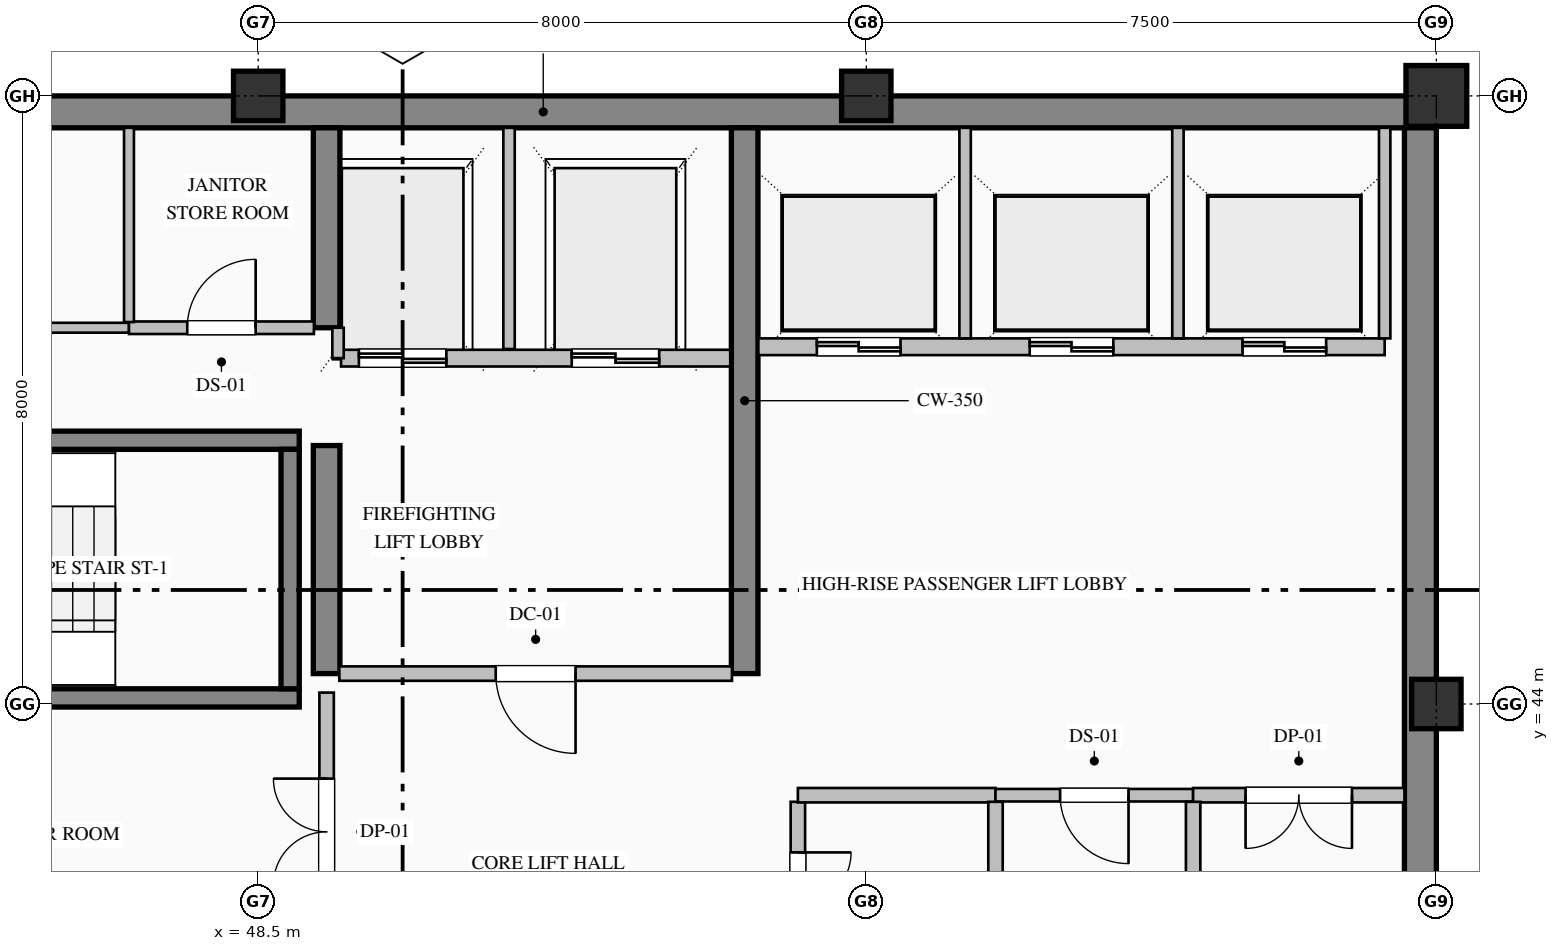
"""IFC4 building model, lengths in metres.
Left out: names, types, materials, properties, quantities, classifications, styles, units other than length and angle.
Written with IfcOpenShell. Run it as: python <this file> out.ifc"""

import sys

from ifc_helpers import new_model, si_unit, direction, frame, frame_2d, origin, origin_2d, place, context, subcontext, project, spatial, rectangle, hollow_rectangle, extrude, element, fill, save


model = new_model("IFC4")
c1 = context("Model", 3, precision=1e-05, world=origin(), true_north=direction((0.0, 1.0)))
c2 = subcontext(c1, "Body", "Model", "MODEL_VIEW")
j1 = project(units=[si_unit("LENGTHUNIT", "METRE"), si_unit("PLANEANGLEUNIT", "RADIAN")], contexts=[c1])
p1 = place(None, origin())
s1 = spatial("IfcSite", under=j1, at=p1, CompositionType="ELEMENT")
p2 = place(p1, origin())
s2 = spatial("IfcBuilding", under=s1, at=p2, CompositionType="ELEMENT")
p3 = place(p2, frame((0.0, 0.0, 373.0)))
s3 = spatial("IfcBuildingStorey", under=s2, at=p3, CompositionType="ELEMENT", Elevation=373.0)
p4 = place(p3, frame((40.5, 51.79, 0.0), z_axis=(0.0, 0.0, 1.0), x_axis=(1.0, 0.0, 0.0)))
e1 = element("IfcWall", 1, at=p4, inside=s3, PredefinedType="SHEAR", context=c2, shape_type="SweptSolid", body=[
    extrude(rectangle(XDim=23.5, YDim=0.42, at=frame_2d((11.75, 0.0))), origin(), (0.0, 0.0, 1.0), 5.11),
])
p5 = place(p3, frame((63.79, 36.32, 0.0), z_axis=(0.0, 0.0, 1.0), x_axis=(0.0, 1.0, 0.0)))
e2 = element("IfcWall", 2, at=p5, inside=s3, PredefinedType="SHEAR", context=c2, shape_type="SweptSolid", body=[
    extrude(rectangle(XDim=15.26, YDim=0.42, at=frame_2d((7.63, 0.0))), origin(), (0.0, 0.0, 1.0), 5.11),
])
p6 = place(p3, frame((49.4, 44.4, 0.0), z_axis=(0.0, 0.0, 1.0), x_axis=(0.0, 1.0, 0.0)))
e3 = element("IfcWall", 3, at=p6, inside=s3, PredefinedType="SHEAR", context=c2, shape_type="SweptSolid", body=[
    extrude(rectangle(XDim=3.0, YDim=0.35, at=frame_2d((1.5, 0.0))), origin(), (0.0, 0.0, 1.0), 5.11),
])
p7 = place(p3, frame((49.4, 48.95, 0.0), z_axis=(0.0, 0.0, 1.0), x_axis=(0.0, 1.0, 0.0)))
e4 = element("IfcWall", 4, at=p7, inside=s3, PredefinedType="SHEAR", context=c2, shape_type="SweptSolid", body=[
    extrude(rectangle(XDim=2.63, YDim=0.35, at=frame_2d((1.315, 0.0))), origin(), (0.0, 0.0, 1.0), 5.11),
])
p8 = place(p3, frame((54.9, 44.4, 0.0), z_axis=(0.0, 0.0, 1.0), x_axis=(0.0, 1.0, 0.0)))
e5 = element("IfcWall", 5, at=p8, inside=s3, PredefinedType="SHEAR", context=c2, shape_type="SweptSolid", body=[
    extrude(rectangle(XDim=7.18, YDim=0.35, at=frame_2d((3.59, 0.0))), origin(), (0.0, 0.0, 1.0), 5.11),
])
for number, where, z_axis, x_axis in (
    (6, (48.5, 52.0, 0.0), (0.0, 0.0, 1.0), (1.0, 0.0, 0.0)),
    (7, (56.5, 52.0, 0.0), (0.0, 0.0, 1.0), (1.0, 0.0, 0.0)),
    (8, (64.0, 44.0, 0.0), (0.0, 0.0, 1.0), (1.0, 0.0, 0.0)),
):
    element("IfcColumn", number, at=place(p3, frame(where, z_axis=z_axis, x_axis=x_axis)), inside=s3, PredefinedType="COLUMN", context=c2, shape_type="SweptSolid", body=[
        extrude(hollow_rectangle(XDim=0.65, YDim=0.65, WallThickness=0.028, at=origin_2d()), origin(), (0.0, 0.0, 1.0), 5.4),
    ])
p9 = place(p3, frame((64.0, 52.0, 0.0), z_axis=(0.0, 0.0, 1.0), x_axis=(1.0, 0.0, 0.0)))
e9 = element("IfcColumn", 9, at=p9, inside=s3, PredefinedType="COLUMN", context=c2, shape_type="SweptSolid", body=[
    extrude(hollow_rectangle(XDim=0.8, YDim=0.8, WallThickness=0.032, at=origin_2d()), origin(), (0.0, 0.0, 1.0), 5.4),
])
for number, where, z_axis, x_axis in (
    (10, (40.96, 47.47, 0.0), (0.0, 0.0, 1.0), (1.0, 0.0, 0.0)),
    (11, (49.04, 44.08, 0.0), (0.0, 0.0, 1.0), (-1.0, 0.0, 0.0)),
):
    element("IfcWall", number, at=place(p3, frame(where, z_axis=z_axis, x_axis=x_axis)), inside=s3, PredefinedType="SOLIDWALL", context=c2, shape_type="SweptSolid", body=[
        extrude(rectangle(XDim=8.08, YDim=0.24, at=frame_2d((4.04, 0.0))), origin(), (0.0, 0.0, 1.0), 5.4),
    ])
p10 = place(p3, frame((48.92, 44.2, 0.0), z_axis=(0.0, 0.0, 1.0), x_axis=(0.0, 1.0, 0.0)))
e12 = element("IfcWall", 12, at=p10, inside=s3, PredefinedType="SOLIDWALL", context=c2, shape_type="SweptSolid", body=[
    extrude(rectangle(XDim=3.15, YDim=0.24, at=frame_2d((1.575, 0.0))), origin(), (0.0, 0.0, 1.0), 5.4),
])
p11 = place(p3, frame((54.71, 48.55, 0.0), z_axis=(0.0, 0.0, 1.0), x_axis=(-1.0, 0.0, 0.0)))
e13 = element("IfcWall", 13, at=p11, inside=s3, PredefinedType="PARTITIONING", context=c2, shape_type="SweptSolid", body=[
    extrude(rectangle(XDim=5.12, YDim=0.22, at=frame_2d((2.56, 0.0))), origin(), (0.0, 0.0, 1.0), 5.11),
])
p12 = place(p11, frame((3.735, 0.0, 0.0)))
e14 = element("IfcOpeningElement", 14, at=p12, cuts=e13, PredefinedType="OPENING", context=c2, shape_type="SweptSolid", body=[
    extrude(rectangle(XDim=1.15, YDim=2.2, at=frame_2d((0.575, 1.1))), frame((0.0, 0.12, 0.0), z_axis=(0.0, -1.0, 0.0), x_axis=(1.0, 0.0, 0.0)), (0.0, 0.0, 1.0), 0.24),
])
p13 = place(p11, frame((0.935, 0.0, 0.0)))
e15 = element("IfcOpeningElement", 15, at=p13, cuts=e13, PredefinedType="OPENING", context=c2, shape_type="SweptSolid", body=[
    extrude(rectangle(XDim=1.15, YDim=2.2, at=frame_2d((0.575, 1.1))), frame((0.0, 0.12, 0.0), z_axis=(0.0, -1.0, 0.0), x_axis=(1.0, 0.0, 0.0)), (0.0, 0.0, 1.0), 0.24),
])
p14 = place(p3, frame((51.8, 48.67, 0.0), z_axis=(0.0, 0.0, 1.0), x_axis=(0.0, 1.0, 0.0)))
e16 = element("IfcWall", 16, at=p14, inside=s3, PredefinedType="PARTITIONING", context=c2, shape_type="SweptSolid", body=[
    extrude(rectangle(XDim=2.91, YDim=0.15, at=frame_2d((1.455, 0.0))), origin(), (0.0, 0.0, 1.0), 5.11),
])
p15 = place(p3, frame((49.55, 48.55, 0.0), z_axis=(0.0, 0.0, 1.0), x_axis=(0.0, 1.0, 0.0)))
e17 = element("IfcWall", 17, at=p15, inside=s3, PredefinedType="PARTITIONING", context=c2, shape_type="SweptSolid", body=[
    extrude(rectangle(XDim=0.4, YDim=0.15, at=frame_2d((0.2, 0.0))), origin(), (0.0, 0.0, 1.0), 5.11),
])
p16 = place(p3, frame((63.32, 48.7, 0.0), z_axis=(0.0, 0.0, 1.0), x_axis=(-1.0, 0.0, 0.0)))
e18 = element("IfcWall", 18, at=p16, inside=s3, PredefinedType="PARTITIONING", context=c2, shape_type="SweptSolid", body=[
    extrude(rectangle(XDim=8.24, YDim=0.22, at=frame_2d((4.12, 0.0))), origin(), (0.0, 0.0, 1.0), 5.11),
])
p17 = place(p16, frame((6.37, 0.0, 0.0)))
e19 = element("IfcOpeningElement", 19, at=p17, cuts=e18, PredefinedType="OPENING", context=c2, shape_type="SweptSolid", body=[
    extrude(rectangle(XDim=1.1, YDim=2.2, at=frame_2d((0.55, 1.1))), frame((0.0, 0.12, 0.0), z_axis=(0.0, -1.0, 0.0), x_axis=(1.0, 0.0, 0.0)), (0.0, 0.0, 1.0), 0.24),
])
p18 = place(p16, frame((3.57, 0.0, 0.0)))
e20 = element("IfcOpeningElement", 20, at=p18, cuts=e18, PredefinedType="OPENING", context=c2, shape_type="SweptSolid", body=[
    extrude(rectangle(XDim=1.1, YDim=2.2, at=frame_2d((0.55, 1.1))), frame((0.0, 0.12, 0.0), z_axis=(0.0, -1.0, 0.0), x_axis=(1.0, 0.0, 0.0)), (0.0, 0.0, 1.0), 0.24),
])
p19 = place(p16, frame((0.77, 0.0, 0.0)))
e21 = element("IfcOpeningElement", 21, at=p19, cuts=e18, PredefinedType="OPENING", context=c2, shape_type="SweptSolid", body=[
    extrude(rectangle(XDim=1.1, YDim=2.2, at=frame_2d((0.55, 1.1))), frame((0.0, 0.12, 0.0), z_axis=(0.0, -1.0, 0.0), x_axis=(1.0, 0.0, 0.0)), (0.0, 0.0, 1.0), 0.24),
])
for number, where, z_axis, x_axis in (
    (22, (57.8, 48.81, 0.0), (0.0, 0.0, 1.0), (0.0, 1.0, 0.0)),
    (23, (60.6, 48.81, 0.0), (0.0, 0.0, 1.0), (0.0, 1.0, 0.0)),
    (24, (63.32, 48.81, 0.0), (0.0, 0.0, 1.0), (0.0, 1.0, 0.0)),
):
    element("IfcWall", number, at=place(p3, frame(where, z_axis=z_axis, x_axis=x_axis)), inside=s3, PredefinedType="PARTITIONING", context=c2, shape_type="SweptSolid", body=[
        extrude(rectangle(XDim=2.77, YDim=0.15, at=frame_2d((1.385, 0.0))), origin(), (0.0, 0.0, 1.0), 5.11),
    ])
p20 = place(p3, frame((40.92, 48.95, 0.0), z_axis=(0.0, 0.0, 1.0), x_axis=(1.0, 0.0, 0.0)))
e25 = element("IfcWall", 25, at=p20, inside=s3, PredefinedType="PARTITIONING", context=c2, shape_type="SweptSolid", body=[
    extrude(rectangle(XDim=5.88, YDim=0.13, at=frame_2d((2.94, 0.0))), origin(), (0.0, 0.0, 1.0), 5.11),
])
p21 = place(p20, frame((2.48, 0.0, 0.0)))
e26 = element("IfcOpeningElement", 26, at=p21, cuts=e25, PredefinedType="OPENING", context=c2, shape_type="SweptSolid", body=[
    extrude(rectangle(XDim=0.92, YDim=2.15, at=frame_2d((0.46, 1.075))), frame((0.0, 0.075, 0.0), z_axis=(0.0, -1.0, 0.0), x_axis=(1.0, 0.0, 0.0)), (0.0, 0.0, 1.0), 0.15),
])
p22 = place(p3, frame((46.8, 48.95, 0.0), z_axis=(0.0, 0.0, 1.0), x_axis=(1.0, 0.0, 0.0)))
e27 = element("IfcWall", 27, at=p22, inside=s3, PredefinedType="PARTITIONING", context=c2, shape_type="SweptSolid", body=[
    extrude(rectangle(XDim=2.433, YDim=0.165, at=frame_2d((1.216, 0.0))), origin(), (0.0, 0.0, 1.0), 5.11),
])
p23 = place(p22, frame((0.767, 0.0, 0.0)))
e28 = element("IfcOpeningElement", 28, at=p23, cuts=e27, PredefinedType="OPENING", context=c2, shape_type="SweptSolid", body=[
    extrude(rectangle(XDim=0.9, YDim=2.15, at=frame_2d((0.45, 1.075))), frame((0.0, 0.093, 0.0), z_axis=(0.0, -1.0, 0.0), x_axis=(1.0, 0.0, 0.0)), (0.0, 0.0, 1.0), 0.185),
])
p24 = place(p3, frame((54.733, 44.4, 0.0), z_axis=(0.0, 0.0, 1.0), x_axis=(-1.0, 0.0, 0.0)))
e29 = element("IfcWall", 29, at=p24, inside=s3, PredefinedType="PARTITIONING", context=c2, shape_type="SweptSolid", body=[
    extrude(rectangle(XDim=5.166, YDim=0.19, at=frame_2d((2.583, 0.0))), origin(), (0.0, 0.0, 1.0), 5.11),
])
p25 = place(p24, frame((2.058, 0.0, 0.0)))
e30 = element("IfcOpeningElement", 30, at=p25, cuts=e29, PredefinedType="OPENING", context=c2, shape_type="SweptSolid", body=[
    extrude(rectangle(XDim=1.05, YDim=2.15, at=frame_2d((0.525, 1.075))), frame((0.0, 0.105, 0.0), z_axis=(0.0, -1.0, 0.0), x_axis=(1.0, 0.0, 0.0)), (0.0, 0.0, 1.0), 0.21),
])
p26 = place(p3, frame((49.4, 40.487, 0.0), z_axis=(0.0, 0.0, 1.0), x_axis=(0.0, 1.0, 0.0)))
e31 = element("IfcWall", 31, at=p26, inside=s3, PredefinedType="PARTITIONING", context=c2, shape_type="SweptSolid", body=[
    extrude(rectangle(XDim=3.663, YDim=0.19, at=frame_2d((1.832, 0.0))), origin(), (0.0, 0.0, 1.0), 4.352),
])
p27 = place(p26, frame((1.132, 0.0, 0.0)))
e32 = element("IfcOpeningElement", 32, at=p27, cuts=e31, PredefinedType="OPENING", context=c2, shape_type="SweptSolid", body=[
    extrude(rectangle(XDim=1.4, YDim=2.25, at=frame_2d((0.7, 1.125))), frame((0.0, 0.105, 0.0), z_axis=(0.0, -1.0, 0.0), x_axis=(1.0, 0.0, 0.0)), (0.0, 0.0, 1.0), 0.21),
])
p28 = place(p3, frame((55.6, 42.713, 0.0), z_axis=(0.0, 0.0, 1.0), x_axis=(0.0, -1.0, 0.0)))
e33 = element("IfcWall", 33, at=p28, inside=s3, PredefinedType="PARTITIONING", context=c2, shape_type="SweptSolid", body=[
    extrude(rectangle(XDim=2.731, YDim=0.19, at=frame_2d((1.365, 0.0))), origin(), (0.0, 0.0, 1.0), 5.11),
])
p29 = place(p28, frame((0.666, 0.0, 0.0)))
e34 = element("IfcOpeningElement", 34, at=p29, cuts=e33, PredefinedType="OPENING", context=c2, shape_type="SweptSolid", body=[
    extrude(rectangle(XDim=1.4, YDim=2.25, at=frame_2d((0.7, 1.125))), frame((0.0, 0.105, 0.0), z_axis=(0.0, -1.0, 0.0), x_axis=(1.0, 0.0, 0.0)), (0.0, 0.0, 1.0), 0.21),
])
p30 = place(p3, frame((58.2, 42.8, 0.0), z_axis=(0.0, 0.0, 1.0), x_axis=(-1.0, 0.0, 0.0)))
e35 = element("IfcWall", 35, at=p30, inside=s3, PredefinedType="PARTITIONING", context=c2, shape_type="SweptSolid", body=[
    extrude(rectangle(XDim=2.6, YDim=0.19, at=frame_2d((1.3, 0.0))), origin(), (0.0, 0.0, 1.0), 5.11),
])
p31 = place(p3, frame((60.8, 42.8, 0.0), z_axis=(0.0, 0.0, 1.0), x_axis=(-1.0, 0.0, 0.0)))
e36 = element("IfcWall", 36, at=p31, inside=s3, PredefinedType="PARTITIONING", context=c2, shape_type="SweptSolid", body=[
    extrude(rectangle(XDim=2.6, YDim=0.165, at=frame_2d((1.3, 0.0))), origin(), (0.0, 0.0, 1.0), 5.11),
])
p32 = place(p31, frame((0.85, 0.0, 0.0)))
e37 = element("IfcOpeningElement", 37, at=p32, cuts=e36, PredefinedType="OPENING", context=c2, shape_type="SweptSolid", body=[
    extrude(rectangle(XDim=0.9, YDim=2.15, at=frame_2d((0.45, 1.075))), frame((0.0, 0.093, 0.0), z_axis=(0.0, -1.0, 0.0), x_axis=(1.0, 0.0, 0.0)), (0.0, 0.0, 1.0), 0.185),
])
p33 = place(p3, frame((63.58, 42.8, 0.0), z_axis=(0.0, 0.0, 1.0), x_axis=(-1.0, 0.0, 0.0)))
e38 = element("IfcWall", 38, at=p33, inside=s3, PredefinedType="PARTITIONING", context=c2, shape_type="SweptSolid", body=[
    extrude(rectangle(XDim=2.78, YDim=0.19, at=frame_2d((1.39, 0.0))), origin(), (0.0, 0.0, 1.0), 5.11),
])
p34 = place(p33, frame((0.69, 0.0, 0.0)))
e39 = element("IfcOpeningElement", 39, at=p34, cuts=e38, PredefinedType="OPENING", context=c2, shape_type="SweptSolid", body=[
    extrude(rectangle(XDim=1.4, YDim=2.25, at=frame_2d((0.7, 1.125))), frame((0.0, 0.105, 0.0), z_axis=(0.0, -1.0, 0.0), x_axis=(1.0, 0.0, 0.0)), (0.0, 0.0, 1.0), 0.21),
])
p35 = place(p3, frame((46.8, 51.58, 0.0), z_axis=(0.0, 0.0, 1.0), x_axis=(0.0, -1.0, 0.0)))
e40 = element("IfcWall", 40, at=p35, inside=s3, PredefinedType="PARTITIONING", context=c2, shape_type="SweptSolid", body=[
    extrude(rectangle(XDim=2.556, YDim=0.13, at=frame_2d((1.278, 0.0))), origin(), (0.0, 0.0, 1.0), 5.11),
])
for number, where, z_axis, x_axis in (
    (41, (58.2, 42.713, 0.0), (0.0, 0.0, 1.0), (0.0, -1.0, 0.0)),
    (42, (60.8, 42.713, 0.0), (0.0, 0.0, 1.0), (0.0, -1.0, 0.0)),
):
    element("IfcWall", number, at=place(p3, frame(where, z_axis=z_axis, x_axis=x_axis)), inside=s3, PredefinedType="PARTITIONING", context=c2, shape_type="SweptSolid", body=[
        extrude(rectangle(XDim=2.731, YDim=0.19, at=frame_2d((1.365, 0.0))), origin(), (0.0, 0.0, 1.0), 5.11),
    ])
p36 = place(p12, origin())
e43 = element("IfcDoor", 43, at=p36, inside=s3, OperationType="DOUBLE_DOOR_SLIDING", PredefinedType="DOOR", context=c2, shape_type="SweptSolid", body=[
    extrude(rectangle(XDim=1.15, YDim=2.2, at=frame_2d((0.575, 1.1))), frame((0.0, 0.025, 0.0), z_axis=(0.0, -1.0, 0.0), x_axis=(1.0, 0.0, 0.0)), (0.0, 0.0, 1.0), 0.05),
])
fill(e14, e43)
p37 = place(p13, origin())
e44 = element("IfcDoor", 44, at=p37, inside=s3, OperationType="DOUBLE_DOOR_SLIDING", PredefinedType="DOOR", context=c2, shape_type="SweptSolid", body=[
    extrude(rectangle(XDim=1.15, YDim=2.2, at=frame_2d((0.575, 1.1))), frame((0.0, 0.025, 0.0), z_axis=(0.0, -1.0, 0.0), x_axis=(1.0, 0.0, 0.0)), (0.0, 0.0, 1.0), 0.05),
])
fill(e15, e44)
p38 = place(p17, origin())
e45 = element("IfcDoor", 45, at=p38, inside=s3, OperationType="DOUBLE_DOOR_SLIDING", PredefinedType="DOOR", context=c2, shape_type="SweptSolid", body=[
    extrude(rectangle(XDim=1.1, YDim=2.2, at=frame_2d((0.55, 1.1))), frame((0.0, 0.025, 0.0), z_axis=(0.0, -1.0, 0.0), x_axis=(1.0, 0.0, 0.0)), (0.0, 0.0, 1.0), 0.05),
])
fill(e19, e45)
p39 = place(p18, origin())
e46 = element("IfcDoor", 46, at=p39, inside=s3, OperationType="DOUBLE_DOOR_SLIDING", PredefinedType="DOOR", context=c2, shape_type="SweptSolid", body=[
    extrude(rectangle(XDim=1.1, YDim=2.2, at=frame_2d((0.55, 1.1))), frame((0.0, 0.025, 0.0), z_axis=(0.0, -1.0, 0.0), x_axis=(1.0, 0.0, 0.0)), (0.0, 0.0, 1.0), 0.05),
])
fill(e20, e46)
p40 = place(p19, origin())
e47 = element("IfcDoor", 47, at=p40, inside=s3, OperationType="DOUBLE_DOOR_SLIDING", PredefinedType="DOOR", context=c2, shape_type="SweptSolid", body=[
    extrude(rectangle(XDim=1.1, YDim=2.2, at=frame_2d((0.55, 1.1))), frame((0.0, 0.025, 0.0), z_axis=(0.0, -1.0, 0.0), x_axis=(1.0, 0.0, 0.0)), (0.0, 0.0, 1.0), 0.05),
])
fill(e21, e47)
p41 = place(p25, origin())
e48 = element("IfcDoor", 48, at=p41, inside=s3, OperationType="SINGLE_SWING_LEFT", PredefinedType="DOOR", context=c2, shape_type="SweptSolid", body=[
    extrude(rectangle(XDim=1.05, YDim=2.15, at=frame_2d((0.525, 1.075))), frame((0.0, 0.025, 0.0), z_axis=(0.0, -1.0, 0.0), x_axis=(1.0, 0.0, 0.0)), (0.0, 0.0, 1.0), 0.05),
])
fill(e30, e48)
p42 = place(p27, origin())
e49 = element("IfcDoor", 49, at=p42, inside=s3, OperationType="DOUBLE_DOOR_SINGLE_SWING", PredefinedType="DOOR", context=c2, shape_type="SweptSolid", body=[
    extrude(rectangle(XDim=1.4, YDim=2.25, at=frame_2d((0.7, 1.125))), frame((0.0, 0.025, 0.0), z_axis=(0.0, -1.0, 0.0), x_axis=(1.0, 0.0, 0.0)), (0.0, 0.0, 1.0), 0.05),
])
fill(e32, e49)
p43 = place(p23, origin())
e50 = element("IfcDoor", 50, at=p43, inside=s3, OperationType="SINGLE_SWING_RIGHT", PredefinedType="DOOR", context=c2, shape_type="SweptSolid", body=[
    extrude(rectangle(XDim=0.9, YDim=2.15, at=frame_2d((0.45, 1.075))), frame((0.0, 0.025, 0.0), z_axis=(0.0, -1.0, 0.0), x_axis=(1.0, 0.0, 0.0)), (0.0, 0.0, 1.0), 0.05),
])
fill(e28, e50)
p44 = place(p29, origin())
e51 = element("IfcDoor", 51, at=p44, inside=s3, OperationType="DOUBLE_DOOR_SINGLE_SWING", PredefinedType="DOOR", context=c2, shape_type="SweptSolid", body=[
    extrude(rectangle(XDim=1.4, YDim=2.25, at=frame_2d((0.7, 1.125))), frame((0.0, 0.025, 0.0), z_axis=(0.0, -1.0, 0.0), x_axis=(1.0, 0.0, 0.0)), (0.0, 0.0, 1.0), 0.05),
])
fill(e34, e51)
p45 = place(p32, origin())
e52 = element("IfcDoor", 52, at=p45, inside=s3, OperationType="SINGLE_SWING_LEFT", PredefinedType="DOOR", context=c2, shape_type="SweptSolid", body=[
    extrude(rectangle(XDim=0.9, YDim=2.15, at=frame_2d((0.45, 1.075))), frame((0.0, 0.025, 0.0), z_axis=(0.0, -1.0, 0.0), x_axis=(1.0, 0.0, 0.0)), (0.0, 0.0, 1.0), 0.05),
])
fill(e37, e52)
p46 = place(p34, origin())
e53 = element("IfcDoor", 53, at=p46, inside=s3, OperationType="DOUBLE_DOOR_SINGLE_SWING", PredefinedType="DOOR", context=c2, shape_type="SweptSolid", body=[
    extrude(rectangle(XDim=1.4, YDim=2.25, at=frame_2d((0.7, 1.125))), frame((0.0, 0.025, 0.0), z_axis=(0.0, -1.0, 0.0), x_axis=(1.0, 0.0, 0.0)), (0.0, 0.0, 1.0), 0.05),
])
fill(e39, e53)
save(model, sys.argv[1])
